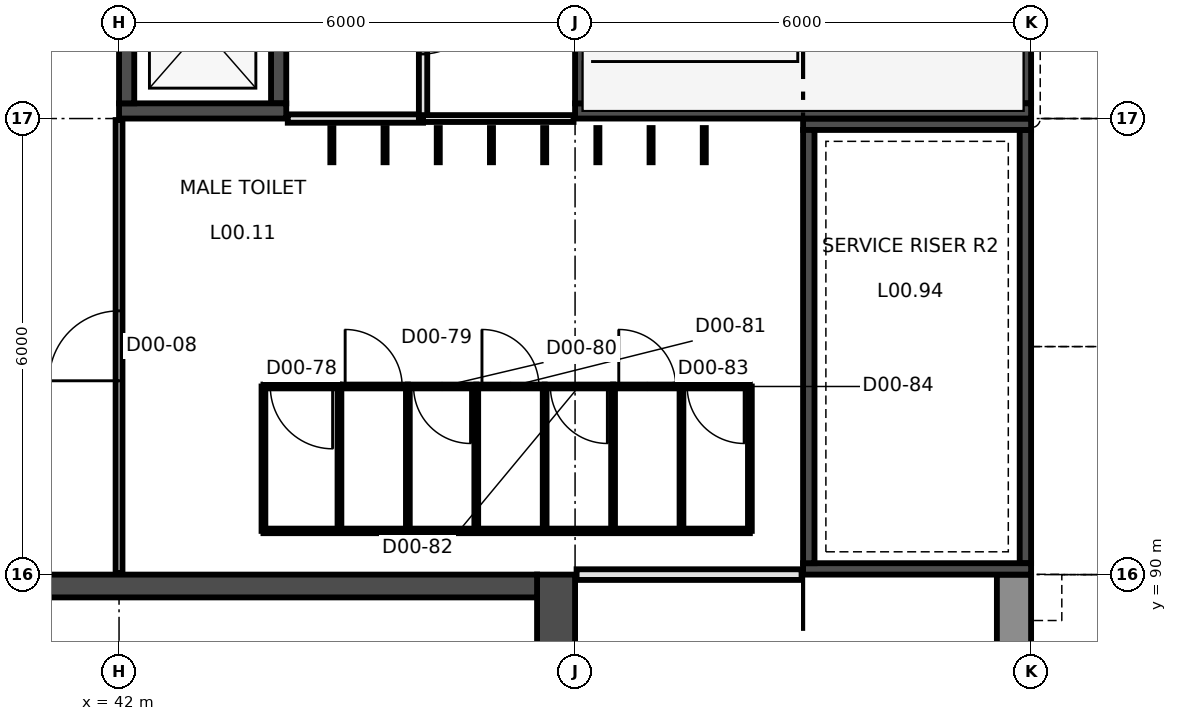
"""IFC4 building model, lengths in metres.
Left out: names, types, materials, properties, quantities, classifications, styles, units other than length and angle.
Written with IfcOpenShell. Run it as: python <this file> out.ifc"""

import sys

from ifc_helpers import new_model, si_unit, direction, frame, frame_2d, origin, place, context, subcontext, project, spatial, rectangle, extrude, element, fill, save


model = new_model("IFC4")
c1 = context("Model", 3, precision=1e-05, world=origin(), true_north=direction((0.0, 1.0)))
c2 = subcontext(c1, "Body", "Model", "MODEL_VIEW")
j1 = project(units=[si_unit("LENGTHUNIT", "METRE"), si_unit("PLANEANGLEUNIT", "RADIAN")], contexts=[c1])
p1 = place(None, origin())
s1 = spatial("IfcSite", under=j1, at=p1, CompositionType="ELEMENT")
p2 = place(p1, origin())
s2 = spatial("IfcBuilding", under=s1, at=p2, CompositionType="ELEMENT")
p3 = place(p2, origin())
s3 = spatial("IfcBuildingStorey", under=s2, at=p3, CompositionType="ELEMENT", Elevation=0.0)
p4 = place(p3, frame((48.0, 96.1, -0.3), z_axis=(0.0, 0.0, 1.0), x_axis=(1.0, 0.0, 0.0)))
e1 = element("IfcWall", 1, at=p4, inside=s3, PredefinedType="SHEAR", context=c2, shape_type="SweptSolid", body=[
    extrude(rectangle(XDim=6.0, YDim=0.2, at=frame_2d((3.0, 0.0))), origin(), (0.0, 0.0, 1.0), 7.3),
])
p5 = place(p3, frame((48.1, 96.2, -0.3), z_axis=(0.0, 0.0, 1.0), x_axis=(0.0, 1.0, 0.0)))
e2 = element("IfcWall", 2, at=p5, inside=s3, PredefinedType="SHEAR", context=c2, shape_type="SweptSolid", body=[
    extrude(rectangle(XDim=5.6, YDim=0.2, at=frame_2d((2.8, 0.0))), origin(), (0.0, 0.0, 1.0), 7.3),
])
p6 = place(p5, frame((4.4, 0.0, 0.3)))
e3 = element("IfcOpeningElement", 3, at=p6, cuts=e2, PredefinedType="OPENING", context=c2, shape_type="SweptSolid", body=[
    extrude(rectangle(XDim=1.1, YDim=2.2, at=frame_2d((0.55, 1.1))), frame((0.0, 0.11, 0.0), z_axis=(0.0, -1.0, 0.0), x_axis=(1.0, 0.0, 0.0)), (0.0, 0.0, 1.0), 0.22),
])
p7 = place(p3, frame((53.9, 96.2, -0.3), z_axis=(0.0, 0.0, 1.0), x_axis=(0.0, 1.0, 0.0)))
e4 = element("IfcWall", 4, at=p7, inside=s3, PredefinedType="SHEAR", context=c2, shape_type="SweptSolid", body=[
    extrude(rectangle(XDim=5.6, YDim=0.2, at=frame_2d((2.8, 0.0))), origin(), (0.0, 0.0, 1.0), 7.3),
])
p8 = place(p7, frame((4.4, 0.0, 0.3)))
e5 = element("IfcOpeningElement", 5, at=p8, cuts=e4, PredefinedType="OPENING", context=c2, shape_type="SweptSolid", body=[
    extrude(rectangle(XDim=1.1, YDim=2.4, at=frame_2d((0.55, 1.2))), frame((0.0, 0.11, 0.0), z_axis=(0.0, -1.0, 0.0), x_axis=(1.0, 0.0, 0.0)), (0.0, 0.0, 1.0), 0.22),
])
p9 = place(p3, frame((42.0, 96.1, -1.4), z_axis=(0.0, 0.0, 1.0), x_axis=(1.0, 0.0, 0.0)))
e6 = element("IfcWall", 6, at=p9, inside=s3, PredefinedType="SHEAR", context=c2, shape_type="SweptSolid", body=[
    extrude(rectangle(XDim=2.2, YDim=0.2, at=frame_2d((1.1, 0.0))), origin(), (0.0, 0.0, 1.0), 8.4),
])
for number, where, z_axis, x_axis in (
    (7, (42.1, 96.2, -1.4), (0.0, 0.0, 1.0), (0.0, 1.0, 0.0)),
    (8, (44.1, 96.2, -1.4), (0.0, 0.0, 1.0), (0.0, 1.0, 0.0)),
):
    element("IfcWall", number, at=place(p3, frame(where, z_axis=z_axis, x_axis=x_axis)), inside=s3, PredefinedType="SHEAR", context=c2, shape_type="SweptSolid", body=[
        extrude(rectangle(XDim=2.0, YDim=0.2, at=frame_2d((1.0, 0.0))), origin(), (0.0, 0.0, 1.0), 8.4),
    ])
for number, where, z_axis, x_axis in (
    (9, (51.0, 95.925, -0.3), (0.0, 0.0, 1.0), (1.0, 0.0, 0.0)),
    (10, (51.0, 90.075, -0.3), (0.0, 0.0, 1.0), (1.0, 0.0, 0.0)),
):
    element("IfcWall", number, at=place(p3, frame(where, z_axis=z_axis, x_axis=x_axis)), inside=s3, PredefinedType="SHEAR", context=c2, shape_type="SweptSolid", body=[
        extrude(rectangle(XDim=3.0, YDim=0.15, at=frame_2d((1.5, 0.0))), origin(), (0.0, 0.0, 1.0), 7.3),
    ])
for number, where, z_axis, x_axis in (
    (11, (51.075, 90.15, -0.3), (0.0, 0.0, 1.0), (0.0, 1.0, 0.0)),
    (12, (53.925, 90.15, -0.3), (0.0, 0.0, 1.0), (0.0, 1.0, 0.0)),
):
    element("IfcWall", number, at=place(p3, frame(where, z_axis=z_axis, x_axis=x_axis)), inside=s3, PredefinedType="SHEAR", context=c2, shape_type="SweptSolid", body=[
        extrude(rectangle(XDim=5.7, YDim=0.15, at=frame_2d((2.85, 0.0))), origin(), (0.0, 0.0, 1.0), 7.3),
    ])
p10 = place(p3, frame((47.75, 54.5, -0.3), z_axis=(0.0, 0.0, 1.0), x_axis=(0.0, 1.0, 0.0)))
e13 = element("IfcWall", 13, at=p10, inside=s3, PredefinedType="SHEAR", context=c2, shape_type="SweptSolid", body=[
    extrude(rectangle(XDim=35.5, YDim=0.5, at=frame_2d((17.75, 0.0))), origin(), (0.0, 0.0, 1.0), 7.3),
])
p11 = place(p10, frame((18.05, 0.0, 0.3)))
e14 = element("IfcOpeningElement", 14, at=p11, cuts=e13, PredefinedType="OPENING", context=c2, shape_type="SweptSolid", body=[
    extrude(rectangle(XDim=1.8, YDim=2.1, at=frame_2d((0.9, 1.05))), frame((0.0, 0.26, 0.0), z_axis=(0.0, -1.0, 0.0), x_axis=(1.0, 0.0, 0.0)), (0.0, 0.0, 1.0), 0.52),
])
p12 = place(p10, frame((3.6, 0.0, 0.3)))
e15 = element("IfcOpeningElement", 15, at=p12, cuts=e13, PredefinedType="OPENING", context=c2, shape_type="SweptSolid", body=[
    extrude(rectangle(XDim=1.0, YDim=2.1, at=frame_2d((0.5, 1.05))), frame((0.0, 0.26, 0.0), z_axis=(0.0, -1.0, 0.0), x_axis=(1.0, 0.0, 0.0)), (0.0, 0.0, 1.0), 0.52),
])
p13 = place(p3, frame((18.5, 89.85, -0.3), z_axis=(0.0, 0.0, 1.0), x_axis=(1.0, 0.0, 0.0)))
e16 = element("IfcWall", 16, at=p13, inside=s3, PredefinedType="SHEAR", context=c2, shape_type="SweptSolid", body=[
    extrude(rectangle(XDim=29.0, YDim=0.3, at=frame_2d((14.5, 0.0))), origin(), (0.0, 0.0, 1.0), 7.3),
])
p14 = place(p13, frame((17.95, 0.0, 0.3)))
e17 = element("IfcOpeningElement", 17, at=p14, cuts=e16, PredefinedType="OPENING", context=c2, shape_type="SweptSolid", body=[
    extrude(rectangle(XDim=1.0, YDim=2.1, at=frame_2d((0.5, 1.05))), frame((0.0, 0.16, 0.0), z_axis=(0.0, -1.0, 0.0), x_axis=(1.0, 0.0, 0.0)), (0.0, 0.0, 1.0), 0.32),
])
p15 = place(p3, frame((53.775, 90.0, 0.0), z_axis=(0.0, 0.0, 1.0), x_axis=(0.0, -1.0, 0.0)))
e18 = element("IfcWall", 18, at=p15, inside=s3, PredefinedType="SOLIDWALL", context=c2, shape_type="SweptSolid", body=[
    extrude(rectangle(XDim=5.625, YDim=0.45, at=frame_2d((2.812, 0.0))), origin(), (0.0, 0.0, 1.0), 6.05),
])
p16 = place(p15, frame((2.212, 0.0, 0.9)))
e19 = element("IfcOpeningElement", 19, at=p16, cuts=e18, PredefinedType="OPENING", context=c2, shape_type="SweptSolid", body=[
    extrude(rectangle(XDim=1.2, YDim=1.8, at=frame_2d((0.6, 0.9))), frame((0.0, 0.235, 0.0), z_axis=(0.0, -1.0, 0.0), x_axis=(1.0, 0.0, 0.0)), (0.0, 0.0, 1.0), 0.47),
])
p17 = place(p3, frame((44.22, 96.0, 0.0), z_axis=(0.0, 0.0, 1.0), x_axis=(1.0, 0.0, 0.0)))
e20 = element("IfcWall", 20, at=p17, inside=s3, PredefinedType="PARTITIONING", context=c2, shape_type="SweptSolid", body=[
    extrude(rectangle(XDim=1.78, YDim=0.11, at=frame_2d((0.89, 0.0))), origin(), (0.0, 0.0, 1.0), 6.15),
])
p18 = place(p3, frame((46.0, 96.0, 0.0), z_axis=(0.0, 0.0, 1.0), x_axis=(0.0, 1.0, 0.0)))
e21 = element("IfcWall", 21, at=p18, inside=s3, PredefinedType="PARTITIONING", context=c2, shape_type="SweptSolid", body=[
    extrude(rectangle(XDim=2.4, YDim=0.11, at=frame_2d((1.2, 0.0))), origin(), (0.0, 0.0, 1.0), 6.15),
])
p19 = place(p18, frame((0.85, 0.0, 0.0)))
e22 = element("IfcOpeningElement", 22, at=p19, cuts=e21, PredefinedType="OPENING", context=c2, shape_type="SweptSolid", body=[
    extrude(rectangle(XDim=0.75, YDim=2.04, at=frame_2d((0.375, 1.02))), frame((0.0, 0.065, 0.0), z_axis=(0.0, -1.0, 0.0), x_axis=(1.0, 0.0, 0.0)), (0.0, 0.0, 1.0), 0.13),
])
p20 = place(p3, frame((48.02, 90.0, 0.0), z_axis=(0.0, 0.0, 1.0), x_axis=(1.0, 0.0, 0.0)))
e23 = element("IfcWall", 23, at=p20, inside=s3, PredefinedType="PARTITIONING", context=c2, shape_type="SweptSolid", body=[
    extrude(rectangle(XDim=2.96, YDim=0.14, at=frame_2d((1.48, 0.0))), origin(), (0.0, 0.0, 1.0), 5.5),
])
p21 = place(p3, frame((42.0, 90.02, 0.0), z_axis=(0.0, 0.0, 1.0), x_axis=(0.0, 1.0, 0.0)))
e24 = element("IfcWall", 24, at=p21, inside=s3, PredefinedType="PARTITIONING", context=c2, shape_type="SweptSolid", body=[
    extrude(rectangle(XDim=5.96, YDim=0.09, at=frame_2d((2.98, 0.0))), origin(), (0.0, 0.0, 1.0), 2.75),
])
p22 = place(p21, frame((2.53, 0.0, 0.0)))
e25 = element("IfcOpeningElement", 25, at=p22, cuts=e24, PredefinedType="OPENING", context=c2, shape_type="SweptSolid", body=[
    extrude(rectangle(XDim=0.92, YDim=2.04, at=frame_2d((0.46, 1.02))), frame((0.0, 0.055, 0.0), z_axis=(0.0, -1.0, 0.0), x_axis=(1.0, 0.0, 0.0)), (0.0, 0.0, 1.0), 0.11),
])
p23 = place(p3, frame((46.0, 96.0, 0.0), z_axis=(0.0, 0.0, 1.0), x_axis=(1.0, 0.0, 0.0)))
e26 = element("IfcWall", 26, at=p23, inside=s3, PredefinedType="PARTITIONING", context=c2, shape_type="SweptSolid", body=[
    extrude(rectangle(XDim=1.98, YDim=0.09, at=frame_2d((0.99, 0.0))), origin(), (0.0, 0.0, 1.0), 6.15),
])
p24 = place(p3, frame((43.9, 90.575, 0.0), z_axis=(0.0, 0.0, 1.0), x_axis=(1.0, 0.0, 0.0)))
e27 = element("IfcWall", 27, at=p24, inside=s3, PredefinedType="PARTITIONING", context=c2, shape_type="SweptSolid", body=[
    extrude(rectangle(XDim=6.4, YDim=0.06, at=frame_2d((3.2, 0.0))), origin(), (0.0, 0.0, 1.0), 2.1),
])
for number, where, z_axis, x_axis in (
    (28, (43.9, 90.575, 0.0), (0.0, 0.0, 1.0), (0.0, 1.0, 0.0)),
    (29, (44.9, 90.575, 0.0), (0.0, 0.0, 1.0), (0.0, 1.0, 0.0)),
    (30, (45.8, 90.575, 0.0), (0.0, 0.0, 1.0), (0.0, 1.0, 0.0)),
    (31, (46.7, 90.575, 0.0), (0.0, 0.0, 1.0), (0.0, 1.0, 0.0)),
    (32, (47.6, 90.575, 0.0), (0.0, 0.0, 1.0), (0.0, 1.0, 0.0)),
    (33, (48.5, 90.575, 0.0), (0.0, 0.0, 1.0), (0.0, 1.0, 0.0)),
    (34, (49.4, 90.575, 0.0), (0.0, 0.0, 1.0), (0.0, 1.0, 0.0)),
    (35, (50.3, 90.575, 0.0), (0.0, 0.0, 1.0), (0.0, 1.0, 0.0)),
):
    element("IfcWall", number, at=place(p3, frame(where, z_axis=z_axis, x_axis=x_axis)), inside=s3, PredefinedType="PARTITIONING", context=c2, shape_type="SweptSolid", body=[
        extrude(rectangle(XDim=1.9, YDim=0.05, at=frame_2d((0.95, 0.0))), origin(), (0.0, 0.0, 1.0), 2.1),
    ])
p25 = place(p3, frame((43.9, 92.475, 0.0), z_axis=(0.0, 0.0, 1.0), x_axis=(1.0, 0.0, 0.0)))
e36 = element("IfcWall", 36, at=p25, inside=s3, PredefinedType="PARTITIONING", context=c2, shape_type="SweptSolid", body=[
    extrude(rectangle(XDim=1.0, YDim=0.05, at=frame_2d((0.5, 0.0))), origin(), (0.0, 0.0, 1.0), 2.1),
])
p26 = place(p25, frame((0.09, 0.0, 0.0)))
e37 = element("IfcOpeningElement", 37, at=p26, cuts=e36, PredefinedType="OPENING", context=c2, shape_type="SweptSolid", body=[
    extrude(rectangle(XDim=0.82, YDim=2.0, at=frame_2d((0.41, 1.0))), frame((0.0, 0.035, 0.0), z_axis=(0.0, -1.0, 0.0), x_axis=(1.0, 0.0, 0.0)), (0.0, 0.0, 1.0), 0.07),
])
p27 = place(p3, frame((44.9, 92.475, 0.0), z_axis=(0.0, 0.0, 1.0), x_axis=(1.0, 0.0, 0.0)))
e38 = element("IfcWall", 38, at=p27, inside=s3, PredefinedType="PARTITIONING", context=c2, shape_type="SweptSolid", body=[
    extrude(rectangle(XDim=0.9, YDim=0.05, at=frame_2d((0.45, 0.0))), origin(), (0.0, 0.0, 1.0), 2.1),
])
p28 = place(p27, frame((0.075, 0.0, 0.0)))
e39 = element("IfcOpeningElement", 39, at=p28, cuts=e38, PredefinedType="OPENING", context=c2, shape_type="SweptSolid", body=[
    extrude(rectangle(XDim=0.75, YDim=2.0, at=frame_2d((0.375, 1.0))), frame((0.0, 0.035, 0.0), z_axis=(0.0, -1.0, 0.0), x_axis=(1.0, 0.0, 0.0)), (0.0, 0.0, 1.0), 0.07),
])
p29 = place(p3, frame((45.8, 92.475, 0.0), z_axis=(0.0, 0.0, 1.0), x_axis=(1.0, 0.0, 0.0)))
e40 = element("IfcWall", 40, at=p29, inside=s3, PredefinedType="PARTITIONING", context=c2, shape_type="SweptSolid", body=[
    extrude(rectangle(XDim=0.9, YDim=0.05, at=frame_2d((0.45, 0.0))), origin(), (0.0, 0.0, 1.0), 2.1),
])
p30 = place(p29, frame((0.075, 0.0, 0.0)))
e41 = element("IfcOpeningElement", 41, at=p30, cuts=e40, PredefinedType="OPENING", context=c2, shape_type="SweptSolid", body=[
    extrude(rectangle(XDim=0.75, YDim=2.0, at=frame_2d((0.375, 1.0))), frame((0.0, 0.035, 0.0), z_axis=(0.0, -1.0, 0.0), x_axis=(1.0, 0.0, 0.0)), (0.0, 0.0, 1.0), 0.07),
])
p31 = place(p3, frame((46.7, 92.475, 0.0), z_axis=(0.0, 0.0, 1.0), x_axis=(1.0, 0.0, 0.0)))
e42 = element("IfcWall", 42, at=p31, inside=s3, PredefinedType="PARTITIONING", context=c2, shape_type="SweptSolid", body=[
    extrude(rectangle(XDim=0.9, YDim=0.05, at=frame_2d((0.45, 0.0))), origin(), (0.0, 0.0, 1.0), 2.1),
])
p32 = place(p31, frame((0.075, 0.0, 0.0)))
e43 = element("IfcOpeningElement", 43, at=p32, cuts=e42, PredefinedType="OPENING", context=c2, shape_type="SweptSolid", body=[
    extrude(rectangle(XDim=0.75, YDim=2.0, at=frame_2d((0.375, 1.0))), frame((0.0, 0.035, 0.0), z_axis=(0.0, -1.0, 0.0), x_axis=(1.0, 0.0, 0.0)), (0.0, 0.0, 1.0), 0.07),
])
p33 = place(p3, frame((47.6, 92.475, 0.0), z_axis=(0.0, 0.0, 1.0), x_axis=(1.0, 0.0, 0.0)))
e44 = element("IfcWall", 44, at=p33, inside=s3, PredefinedType="PARTITIONING", context=c2, shape_type="SweptSolid", body=[
    extrude(rectangle(XDim=0.9, YDim=0.05, at=frame_2d((0.45, 0.0))), origin(), (0.0, 0.0, 1.0), 2.1),
])
p34 = place(p33, frame((0.075, 0.0, 0.0)))
e45 = element("IfcOpeningElement", 45, at=p34, cuts=e44, PredefinedType="OPENING", context=c2, shape_type="SweptSolid", body=[
    extrude(rectangle(XDim=0.75, YDim=2.0, at=frame_2d((0.375, 1.0))), frame((0.0, 0.035, 0.0), z_axis=(0.0, -1.0, 0.0), x_axis=(1.0, 0.0, 0.0)), (0.0, 0.0, 1.0), 0.07),
])
p35 = place(p3, frame((48.5, 92.475, 0.0), z_axis=(0.0, 0.0, 1.0), x_axis=(1.0, 0.0, 0.0)))
e46 = element("IfcWall", 46, at=p35, inside=s3, PredefinedType="PARTITIONING", context=c2, shape_type="SweptSolid", body=[
    extrude(rectangle(XDim=0.9, YDim=0.05, at=frame_2d((0.45, 0.0))), origin(), (0.0, 0.0, 1.0), 2.1),
])
p36 = place(p35, frame((0.075, 0.0, 0.0)))
e47 = element("IfcOpeningElement", 47, at=p36, cuts=e46, PredefinedType="OPENING", context=c2, shape_type="SweptSolid", body=[
    extrude(rectangle(XDim=0.75, YDim=2.0, at=frame_2d((0.375, 1.0))), frame((0.0, 0.035, 0.0), z_axis=(0.0, -1.0, 0.0), x_axis=(1.0, 0.0, 0.0)), (0.0, 0.0, 1.0), 0.07),
])
p37 = place(p3, frame((49.4, 92.475, 0.0), z_axis=(0.0, 0.0, 1.0), x_axis=(1.0, 0.0, 0.0)))
e48 = element("IfcWall", 48, at=p37, inside=s3, PredefinedType="PARTITIONING", context=c2, shape_type="SweptSolid", body=[
    extrude(rectangle(XDim=0.9, YDim=0.05, at=frame_2d((0.45, 0.0))), origin(), (0.0, 0.0, 1.0), 2.1),
])
p38 = place(p37, frame((0.075, 0.0, 0.0)))
e49 = element("IfcOpeningElement", 49, at=p38, cuts=e48, PredefinedType="OPENING", context=c2, shape_type="SweptSolid", body=[
    extrude(rectangle(XDim=0.75, YDim=2.0, at=frame_2d((0.375, 1.0))), frame((0.0, 0.035, 0.0), z_axis=(0.0, -1.0, 0.0), x_axis=(1.0, 0.0, 0.0)), (0.0, 0.0, 1.0), 0.07),
])
for number, where, z_axis, x_axis in (
    (50, (44.8, 95.425, 0.0), (0.0, 0.0, 1.0), (0.0, 1.0, 0.0)),
    (51, (45.5, 95.425, 0.0), (0.0, 0.0, 1.0), (0.0, 1.0, 0.0)),
    (52, (46.2, 95.425, 0.0), (0.0, 0.0, 1.0), (0.0, 1.0, 0.0)),
    (53, (46.9, 95.425, 0.0), (0.0, 0.0, 1.0), (0.0, 1.0, 0.0)),
    (54, (47.6, 95.425, 0.0), (0.0, 0.0, 1.0), (0.0, 1.0, 0.0)),
    (55, (48.3, 95.425, 0.0), (0.0, 0.0, 1.0), (0.0, 1.0, 0.0)),
    (56, (49.0, 95.425, 0.0), (0.0, 0.0, 1.0), (0.0, 1.0, 0.0)),
    (57, (49.7, 95.425, 0.0), (0.0, 0.0, 1.0), (0.0, 1.0, 0.0)),
):
    element("IfcWall", number, at=place(p3, frame(where, z_axis=z_axis, x_axis=x_axis)), inside=s3, PredefinedType="PARTITIONING", context=c2, shape_type="SweptSolid", body=[
        extrude(rectangle(XDim=0.45, YDim=0.04, at=frame_2d((0.225, 0.0))), origin(), (0.0, 0.0, 1.0), 1.8),
    ])
p39 = place(p22, frame((0.92, 0.0, 0.0), z_axis=(0.0, 0.0, 1.0), x_axis=(-1.0, 0.0, 0.0)))
e58 = element("IfcDoor", 58, at=p39, inside=s3, OperationType="SINGLE_SWING_LEFT", PredefinedType="DOOR", context=c2, shape_type="SweptSolid", body=[
    extrude(rectangle(XDim=0.92, YDim=2.04, at=frame_2d((0.46, 1.02))), frame((0.0, 0.025, 0.0), z_axis=(0.0, -1.0, 0.0), x_axis=(1.0, 0.0, 0.0)), (0.0, 0.0, 1.0), 0.05),
])
fill(e25, e58)
p40 = place(p19, origin())
e59 = element("IfcDoor", 59, at=p40, inside=s3, OperationType="SINGLE_SWING_RIGHT", PredefinedType="DOOR", context=c2, shape_type="SweptSolid", body=[
    extrude(rectangle(XDim=0.75, YDim=2.04, at=frame_2d((0.375, 1.02))), frame((0.0, 0.025, 0.0), z_axis=(0.0, -1.0, 0.0), x_axis=(1.0, 0.0, 0.0)), (0.0, 0.0, 1.0), 0.05),
])
fill(e22, e59)
p41 = place(p26, frame((0.82, 0.0, 0.0), z_axis=(0.0, 0.0, 1.0), x_axis=(-1.0, 0.0, 0.0)))
e60 = element("IfcDoor", 60, at=p41, inside=s3, OperationType="SINGLE_SWING_RIGHT", PredefinedType="DOOR", context=c2, shape_type="SweptSolid", body=[
    extrude(rectangle(XDim=0.82, YDim=2.0, at=frame_2d((0.41, 1.0))), frame((0.0, 0.025, 0.0), z_axis=(0.0, -1.0, 0.0), x_axis=(1.0, 0.0, 0.0)), (0.0, 0.0, 1.0), 0.05),
])
fill(e37, e60)
p42 = place(p28, frame((0.75, 0.0, 0.0), z_axis=(0.0, 0.0, 1.0), x_axis=(-1.0, 0.0, 0.0)))
e61 = element("IfcDoor", 61, at=p42, inside=s3, OperationType="SINGLE_SWING_LEFT", PredefinedType="DOOR", context=c2, shape_type="SweptSolid", body=[
    extrude(rectangle(XDim=0.75, YDim=2.0, at=frame_2d((0.375, 1.0))), frame((0.0, 0.025, 0.0), z_axis=(0.0, -1.0, 0.0), x_axis=(1.0, 0.0, 0.0)), (0.0, 0.0, 1.0), 0.05),
])
fill(e39, e61)
p43 = place(p30, frame((0.75, 0.0, 0.0), z_axis=(0.0, 0.0, 1.0), x_axis=(-1.0, 0.0, 0.0)))
e62 = element("IfcDoor", 62, at=p43, inside=s3, OperationType="SINGLE_SWING_RIGHT", PredefinedType="DOOR", context=c2, shape_type="SweptSolid", body=[
    extrude(rectangle(XDim=0.75, YDim=2.0, at=frame_2d((0.375, 1.0))), frame((0.0, 0.025, 0.0), z_axis=(0.0, -1.0, 0.0), x_axis=(1.0, 0.0, 0.0)), (0.0, 0.0, 1.0), 0.05),
])
fill(e41, e62)
p44 = place(p32, frame((0.75, 0.0, 0.0), z_axis=(0.0, 0.0, 1.0), x_axis=(-1.0, 0.0, 0.0)))
e63 = element("IfcDoor", 63, at=p44, inside=s3, OperationType="SINGLE_SWING_LEFT", PredefinedType="DOOR", context=c2, shape_type="SweptSolid", body=[
    extrude(rectangle(XDim=0.75, YDim=2.0, at=frame_2d((0.375, 1.0))), frame((0.0, 0.025, 0.0), z_axis=(0.0, -1.0, 0.0), x_axis=(1.0, 0.0, 0.0)), (0.0, 0.0, 1.0), 0.05),
])
fill(e43, e63)
p45 = place(p34, frame((0.75, 0.0, 0.0), z_axis=(0.0, 0.0, 1.0), x_axis=(-1.0, 0.0, 0.0)))
e64 = element("IfcDoor", 64, at=p45, inside=s3, OperationType="SINGLE_SWING_RIGHT", PredefinedType="DOOR", context=c2, shape_type="SweptSolid", body=[
    extrude(rectangle(XDim=0.75, YDim=2.0, at=frame_2d((0.375, 1.0))), frame((0.0, 0.025, 0.0), z_axis=(0.0, -1.0, 0.0), x_axis=(1.0, 0.0, 0.0)), (0.0, 0.0, 1.0), 0.05),
])
fill(e45, e64)
p46 = place(p36, frame((0.75, 0.0, 0.0), z_axis=(0.0, 0.0, 1.0), x_axis=(-1.0, 0.0, 0.0)))
e65 = element("IfcDoor", 65, at=p46, inside=s3, OperationType="SINGLE_SWING_LEFT", PredefinedType="DOOR", context=c2, shape_type="SweptSolid", body=[
    extrude(rectangle(XDim=0.75, YDim=2.0, at=frame_2d((0.375, 1.0))), frame((0.0, 0.025, 0.0), z_axis=(0.0, -1.0, 0.0), x_axis=(1.0, 0.0, 0.0)), (0.0, 0.0, 1.0), 0.05),
])
fill(e47, e65)
p47 = place(p38, frame((0.75, 0.0, 0.0), z_axis=(0.0, 0.0, 1.0), x_axis=(-1.0, 0.0, 0.0)))
e66 = element("IfcDoor", 66, at=p47, inside=s3, OperationType="SINGLE_SWING_RIGHT", PredefinedType="DOOR", context=c2, shape_type="SweptSolid", body=[
    extrude(rectangle(XDim=0.75, YDim=2.0, at=frame_2d((0.375, 1.0))), frame((0.0, 0.025, 0.0), z_axis=(0.0, -1.0, 0.0), x_axis=(1.0, 0.0, 0.0)), (0.0, 0.0, 1.0), 0.05),
])
fill(e49, e66)
save(model, sys.argv[1])
